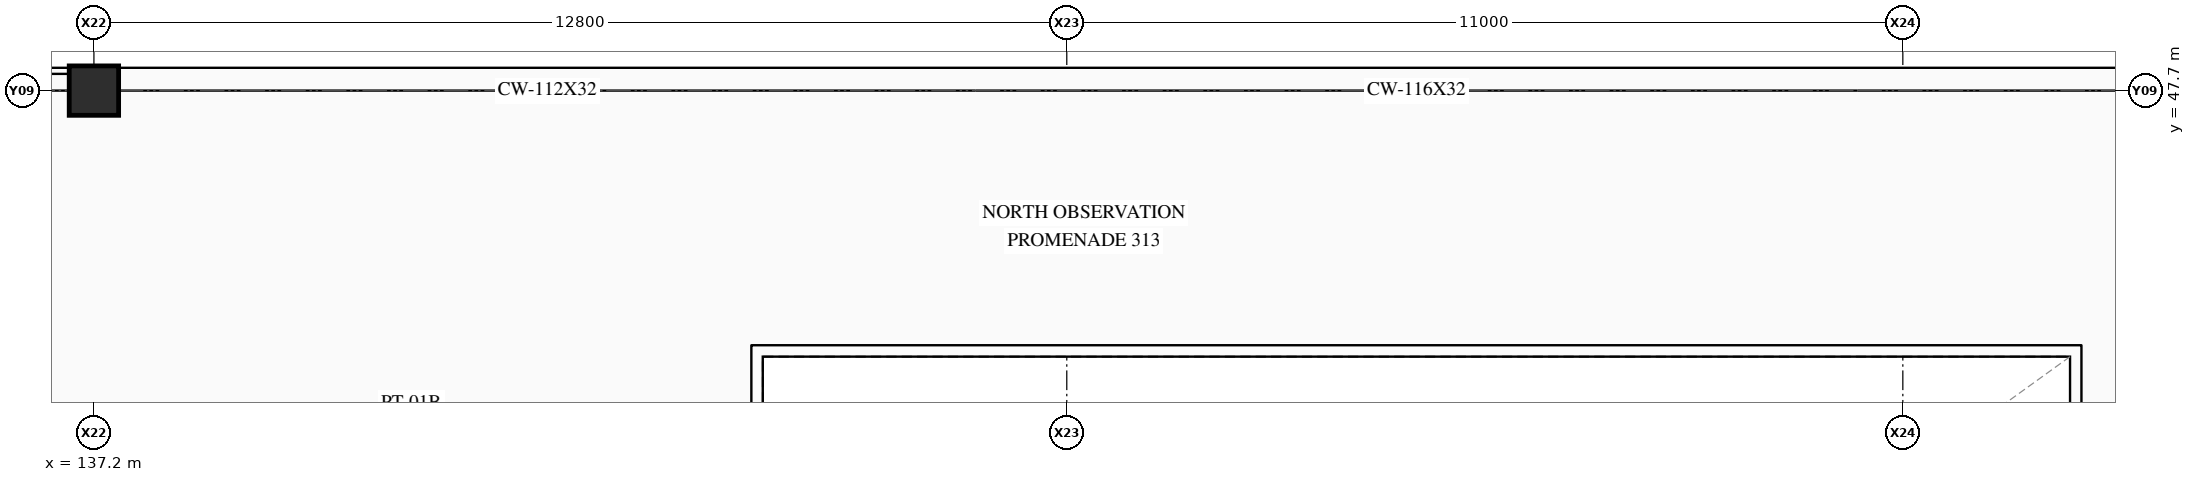
"""IFC4 building model, lengths in metres.
Left out: names, types, materials, properties, quantities, classifications, styles, units other than length and angle.
Written with IfcOpenShell. Run it as: python <this file> out.ifc"""

import sys

from ifc_helpers import new_model, si_unit, direction, frame, origin, origin_2d, place, context, subcontext, project, spatial, rectangle, extrude, element, save


model = new_model("IFC4")
c1 = context("Model", 3, precision=1e-05, world=origin(), true_north=direction((0.0, 1.0)))
c2 = subcontext(c1, "Body", "Model", "MODEL_VIEW")
j1 = project(units=[si_unit("LENGTHUNIT", "METRE"), si_unit("PLANEANGLEUNIT", "RADIAN")], contexts=[c1])
p1 = place(None, origin())
s1 = spatial("IfcSite", under=j1, at=p1, CompositionType="ELEMENT")
p2 = place(p1, origin())
s2 = spatial("IfcBuilding", under=s1, at=p2, CompositionType="ELEMENT")
p3 = place(p2, frame((0.0, 0.0, 14.4)))
s3 = spatial("IfcBuildingStorey", under=s2, at=p3, CompositionType="ELEMENT", Elevation=14.4)
p4 = place(p3, frame((137.2, 47.7, 0.0), z_axis=(0.0, 0.0, 1.0), x_axis=(1.0, 0.0, 0.0)))
e1 = element("IfcColumn", 1, at=p4, inside=s3, PredefinedType="COLUMN", context=c2, shape_type="SweptSolid", body=[
    extrude(rectangle(XDim=0.65, YDim=0.65, at=origin_2d()), origin(), (0.0, 0.0, 1.0), 4.2),
])
save(model, sys.argv[1])
